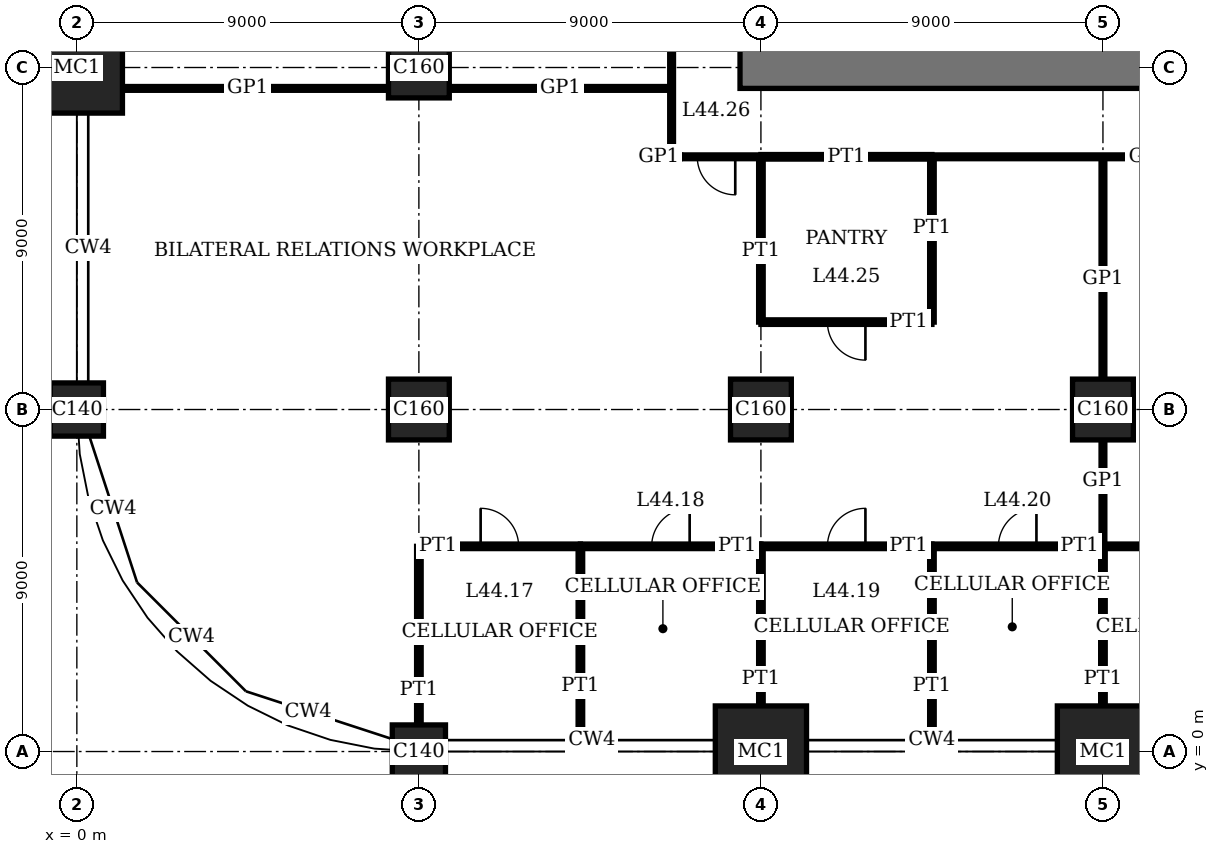
"""IFC4 building model, lengths in metres.
Left out: names, types, materials, properties, quantities, classifications, styles, units other than length and angle.
Written with IfcOpenShell. Run it as: python <this file> out.ifc"""

import sys

from ifc_helpers import new_model, si_unit, direction, frame, frame_2d, origin, origin_2d, place, context, subcontext, project, spatial, rectangle, extrude, element, fill, save


model = new_model("IFC4")
c1 = context("Model", 3, precision=1e-05, world=origin(), true_north=direction((0.0, 1.0)))
c2 = subcontext(c1, "Body", "Model", "MODEL_VIEW")
j1 = project(units=[si_unit("LENGTHUNIT", "METRE"), si_unit("PLANEANGLEUNIT", "RADIAN")], contexts=[c1])
p1 = place(None, origin())
s1 = spatial("IfcSite", under=j1, at=p1, CompositionType="ELEMENT")
p2 = place(p1, origin())
s2 = spatial("IfcBuilding", under=s1, at=p2, CompositionType="ELEMENT")
p3 = place(p2, frame((0.0, 0.0, 182.2)))
s3 = spatial("IfcBuildingStorey", under=s2, at=p3, CompositionType="ELEMENT", Elevation=182.2)
p4 = place(p3, frame((0.0, 9.0, 0.0), z_axis=(0.0, 0.0, 1.0), x_axis=(1.0, 0.0, 0.0)))
e1 = element("IfcColumn", 1, at=p4, inside=s3, PredefinedType="COLUMN", context=c2, shape_type="SweptSolid", body=[
    extrude(rectangle(XDim=1.4, YDim=1.4, at=origin_2d()), origin(), (0.0, 0.0, 1.0), 4.0),
])
p5 = place(p3, frame((0.0, 18.0, 0.0), z_axis=(0.0, 0.0, 1.0), x_axis=(1.0, 0.0, 0.0)))
e2 = element("IfcColumn", 2, at=p5, inside=s3, PredefinedType="COLUMN", context=c2, shape_type="SweptSolid", body=[
    extrude(rectangle(XDim=2.4, YDim=2.4, at=origin_2d()), origin(), (0.0, 0.0, 1.0), 4.0),
])
p6 = place(p3, frame((9.0, 0.0, 0.0), z_axis=(0.0, 0.0, 1.0), x_axis=(1.0, 0.0, 0.0)))
e3 = element("IfcColumn", 3, at=p6, inside=s3, PredefinedType="COLUMN", context=c2, shape_type="SweptSolid", body=[
    extrude(rectangle(XDim=1.4, YDim=1.4, at=origin_2d()), origin(), (0.0, 0.0, 1.0), 4.0),
])
for number, where, z_axis, x_axis in (
    (4, (9.0, 9.0, 0.0), (0.0, 0.0, 1.0), (1.0, 0.0, 0.0)),
    (5, (9.0, 18.0, 0.0), (0.0, 0.0, 1.0), (1.0, 0.0, 0.0)),
):
    element("IfcColumn", number, at=place(p3, frame(where, z_axis=z_axis, x_axis=x_axis)), inside=s3, PredefinedType="COLUMN", context=c2, shape_type="SweptSolid", body=[
        extrude(rectangle(XDim=1.6, YDim=1.6, at=origin_2d()), origin(), (0.0, 0.0, 1.0), 4.0),
    ])
p7 = place(p3, frame((18.0, 0.0, 0.0), z_axis=(0.0, 0.0, 1.0), x_axis=(1.0, 0.0, 0.0)))
e6 = element("IfcColumn", 6, at=p7, inside=s3, PredefinedType="COLUMN", context=c2, shape_type="SweptSolid", body=[
    extrude(rectangle(XDim=2.4, YDim=2.4, at=origin_2d()), origin(), (0.0, 0.0, 1.0), 4.0),
])
p8 = place(p3, frame((18.0, 9.0, 0.0), z_axis=(0.0, 0.0, 1.0), x_axis=(1.0, 0.0, 0.0)))
e7 = element("IfcColumn", 7, at=p8, inside=s3, PredefinedType="COLUMN", context=c2, shape_type="SweptSolid", body=[
    extrude(rectangle(XDim=1.6, YDim=1.6, at=origin_2d()), origin(), (0.0, 0.0, 1.0), 4.0),
])
p9 = place(p3, frame((27.0, 0.0, 0.0), z_axis=(0.0, 0.0, 1.0), x_axis=(1.0, 0.0, 0.0)))
e8 = element("IfcColumn", 8, at=p9, inside=s3, PredefinedType="COLUMN", context=c2, shape_type="SweptSolid", body=[
    extrude(rectangle(XDim=2.4, YDim=2.4, at=origin_2d()), origin(), (0.0, 0.0, 1.0), 4.0),
])
p10 = place(p3, frame((27.0, 9.0, 0.0), z_axis=(0.0, 0.0, 1.0), x_axis=(1.0, 0.0, 0.0)))
e9 = element("IfcColumn", 9, at=p10, inside=s3, PredefinedType="COLUMN", context=c2, shape_type="SweptSolid", body=[
    extrude(rectangle(XDim=1.6, YDim=1.6, at=origin_2d()), origin(), (0.0, 0.0, 1.0), 4.0),
])
p11 = place(p3, frame((17.45, 18.0, 0.0), z_axis=(0.0, 0.0, 1.0), x_axis=(1.0, 0.0, 0.0)))
e10 = element("IfcWall", 10, at=p11, inside=s3, PredefinedType="SHEAR", context=c2, shape_type="SweptSolid", body=[
    extrude(rectangle(XDim=28.1, YDim=1.1, at=frame_2d((14.05, 0.0))), origin(), (0.0, 0.0, 1.0), 4.0),
])
p12 = place(p11, frame((11.55, 0.0, 0.0)))
e11 = element("IfcOpeningElement", 11, at=p12, cuts=e10, PredefinedType="OPENING", context=c2, shape_type="SweptSolid", body=[
    extrude(rectangle(XDim=1.0, YDim=2.4, at=frame_2d((0.5, 1.2))), frame((0.0, 0.56, 0.0), z_axis=(0.0, -1.0, 0.0), x_axis=(1.0, 0.0, 0.0)), (0.0, 0.0, 1.0), 1.12),
])
p13 = place(p11, frame((16.55, 0.0, 0.0)))
e12 = element("IfcOpeningElement", 12, at=p13, cuts=e10, PredefinedType="OPENING", context=c2, shape_type="SweptSolid", body=[
    extrude(rectangle(XDim=1.0, YDim=2.4, at=frame_2d((0.5, 1.2))), frame((0.0, 0.56, 0.0), z_axis=(0.0, -1.0, 0.0), x_axis=(1.0, 0.0, 0.0)), (0.0, 0.0, 1.0), 1.12),
])
p14 = place(p11, frame((20.0, 0.0, 0.0)))
e13 = element("IfcOpeningElement", 13, at=p14, cuts=e10, PredefinedType="OPENING", context=c2, shape_type="SweptSolid", body=[
    extrude(rectangle(XDim=1.1, YDim=2.4, at=frame_2d((0.55, 1.2))), frame((0.0, 0.56, 0.0), z_axis=(0.0, -1.0, 0.0), x_axis=(1.0, 0.0, 0.0)), (0.0, 0.0, 1.0), 1.12),
])
p15 = place(p11, frame((24.05, 0.0, 0.0)))
e14 = element("IfcOpeningElement", 14, at=p15, cuts=e10, PredefinedType="OPENING", context=c2, shape_type="SweptSolid", body=[
    extrude(rectangle(XDim=1.0, YDim=2.4, at=frame_2d((0.5, 1.2))), frame((0.0, 0.56, 0.0), z_axis=(0.0, -1.0, 0.0), x_axis=(1.0, 0.0, 0.0)), (0.0, 0.0, 1.0), 1.12),
])
p16 = place(p3, frame((9.0, 5.4, 0.0), z_axis=(0.0, 0.0, 1.0), x_axis=(1.0, 0.0, 0.0)))
e15 = element("IfcWall", 15, at=p16, inside=s3, PredefinedType="PARTITIONING", context=c2, shape_type="SweptSolid", body=[
    extrude(rectangle(XDim=4.25, YDim=0.12, at=frame_2d((2.125, 0.0))), origin(), (0.0, 0.0, 1.0), 3.75),
])
p17 = place(p16, frame((1.625, 0.0, 0.0)))
e16 = element("IfcOpeningElement", 16, at=p17, cuts=e15, PredefinedType="OPENING", context=c2, shape_type="SweptSolid", body=[
    extrude(rectangle(XDim=1.0, YDim=2.4, at=frame_2d((0.5, 1.2))), frame((0.0, 0.07, 0.0), z_axis=(0.0, -1.0, 0.0), x_axis=(1.0, 0.0, 0.0)), (0.0, 0.0, 1.0), 0.14),
])
p18 = place(p3, frame((13.25, 5.4, 0.0), z_axis=(0.0, 0.0, 1.0), x_axis=(1.0, 0.0, 0.0)))
e17 = element("IfcWall", 17, at=p18, inside=s3, PredefinedType="PARTITIONING", context=c2, shape_type="SweptSolid", body=[
    extrude(rectangle(XDim=4.75, YDim=0.12, at=frame_2d((2.375, 0.0))), origin(), (0.0, 0.0, 1.0), 3.75),
])
p19 = place(p18, frame((1.875, 0.0, 0.0)))
e18 = element("IfcOpeningElement", 18, at=p19, cuts=e17, PredefinedType="OPENING", context=c2, shape_type="SweptSolid", body=[
    extrude(rectangle(XDim=1.0, YDim=2.4, at=frame_2d((0.5, 1.2))), frame((0.0, 0.07, 0.0), z_axis=(0.0, -1.0, 0.0), x_axis=(1.0, 0.0, 0.0)), (0.0, 0.0, 1.0), 0.14),
])
p20 = place(p3, frame((18.0, 5.4, 0.0), z_axis=(0.0, 0.0, 1.0), x_axis=(1.0, 0.0, 0.0)))
e19 = element("IfcWall", 19, at=p20, inside=s3, PredefinedType="PARTITIONING", context=c2, shape_type="SweptSolid", body=[
    extrude(rectangle(XDim=4.5, YDim=0.12, at=frame_2d((2.25, 0.0))), origin(), (0.0, 0.0, 1.0), 3.75),
])
p21 = place(p20, frame((1.75, 0.0, 0.0)))
e20 = element("IfcOpeningElement", 20, at=p21, cuts=e19, PredefinedType="OPENING", context=c2, shape_type="SweptSolid", body=[
    extrude(rectangle(XDim=1.0, YDim=2.4, at=frame_2d((0.5, 1.2))), frame((0.0, 0.07, 0.0), z_axis=(0.0, -1.0, 0.0), x_axis=(1.0, 0.0, 0.0)), (0.0, 0.0, 1.0), 0.14),
])
p22 = place(p3, frame((22.5, 5.4, 0.0), z_axis=(0.0, 0.0, 1.0), x_axis=(1.0, 0.0, 0.0)))
e21 = element("IfcWall", 21, at=p22, inside=s3, PredefinedType="PARTITIONING", context=c2, shape_type="SweptSolid", body=[
    extrude(rectangle(XDim=4.5, YDim=0.12, at=frame_2d((2.25, 0.0))), origin(), (0.0, 0.0, 1.0), 3.75),
])
p23 = place(p22, frame((1.75, 0.0, 0.0)))
e22 = element("IfcOpeningElement", 22, at=p23, cuts=e21, PredefinedType="OPENING", context=c2, shape_type="SweptSolid", body=[
    extrude(rectangle(XDim=1.0, YDim=2.4, at=frame_2d((0.5, 1.2))), frame((0.0, 0.07, 0.0), z_axis=(0.0, -1.0, 0.0), x_axis=(1.0, 0.0, 0.0)), (0.0, 0.0, 1.0), 0.14),
])
p24 = place(p3, frame((27.0, 5.4, 0.0), z_axis=(0.0, 0.0, 1.0), x_axis=(1.0, 0.0, 0.0)))
e23 = element("IfcWall", 23, at=p24, inside=s3, PredefinedType="PARTITIONING", context=c2, shape_type="SweptSolid", body=[
    extrude(rectangle(XDim=4.5, YDim=0.12, at=frame_2d((2.25, 0.0))), origin(), (0.0, 0.0, 1.0), 3.75),
])
p25 = place(p24, frame((1.75, 0.0, 0.0)))
e24 = element("IfcOpeningElement", 24, at=p25, cuts=e23, PredefinedType="OPENING", context=c2, shape_type="SweptSolid", body=[
    extrude(rectangle(XDim=1.0, YDim=2.4, at=frame_2d((0.5, 1.2))), frame((0.0, 0.07, 0.0), z_axis=(0.0, -1.0, 0.0), x_axis=(1.0, 0.0, 0.0)), (0.0, 0.0, 1.0), 0.14),
])
p26 = place(p3, frame((18.0, 11.3, 0.0), z_axis=(0.0, 0.0, 1.0), x_axis=(1.0, 0.0, 0.0)))
e25 = element("IfcWall", 25, at=p26, inside=s3, PredefinedType="PARTITIONING", context=c2, shape_type="SweptSolid", body=[
    extrude(rectangle(XDim=4.5, YDim=0.12, at=frame_2d((2.25, 0.0))), origin(), (0.0, 0.0, 1.0), 3.75),
])
p27 = place(p26, frame((1.75, 0.0, 0.0)))
e26 = element("IfcOpeningElement", 26, at=p27, cuts=e25, PredefinedType="OPENING", context=c2, shape_type="SweptSolid", body=[
    extrude(rectangle(XDim=1.0, YDim=2.4, at=frame_2d((0.5, 1.2))), frame((0.0, 0.07, 0.0), z_axis=(0.0, -1.0, 0.0), x_axis=(1.0, 0.0, 0.0)), (0.0, 0.0, 1.0), 0.14),
])
p28 = place(p3, frame((18.0, 15.65, 0.0), z_axis=(0.0, 0.0, 1.0), x_axis=(1.0, 0.0, 0.0)))
e27 = element("IfcWall", 27, at=p28, inside=s3, PredefinedType="PARTITIONING", context=c2, shape_type="SweptSolid", body=[
    extrude(rectangle(XDim=4.5, YDim=0.12, at=frame_2d((2.25, 0.0))), origin(), (0.0, 0.0, 1.0), 3.75),
])
p29 = place(p3, frame((15.65, 15.65, 0.0), z_axis=(0.0, 0.0, 1.0), x_axis=(1.0, 0.0, 0.0)))
e28 = element("IfcWall", 28, at=p29, inside=s3, PredefinedType="PARTITIONING", context=c2, shape_type="SweptSolid", body=[
    extrude(rectangle(XDim=2.35, YDim=0.1, at=frame_2d((1.175, 0.0))), origin(), (0.0, 0.0, 1.0), 3.75),
])
p30 = place(p29, frame((0.675, 0.0, 0.0)))
e29 = element("IfcOpeningElement", 29, at=p30, cuts=e28, PredefinedType="OPENING", context=c2, shape_type="SweptSolid", body=[
    extrude(rectangle(XDim=1.0, YDim=2.4, at=frame_2d((0.5, 1.2))), frame((0.0, 0.06, 0.0), z_axis=(0.0, -1.0, 0.0), x_axis=(1.0, 0.0, 0.0)), (0.0, 0.0, 1.0), 0.12),
])
p31 = place(p3, frame((22.5, 15.65, 0.0), z_axis=(0.0, 0.0, 1.0), x_axis=(1.0, 0.0, 0.0)))
e30 = element("IfcWall", 30, at=p31, inside=s3, PredefinedType="PARTITIONING", context=c2, shape_type="SweptSolid", body=[
    extrude(rectangle(XDim=24.85, YDim=0.1, at=frame_2d((12.425, 0.0))), origin(), (0.0, 0.0, 1.0), 3.75),
])
p32 = place(p31, frame((11.925, 0.0, 0.0)))
e31 = element("IfcOpeningElement", 31, at=p32, cuts=e30, PredefinedType="OPENING", context=c2, shape_type="SweptSolid", body=[
    extrude(rectangle(XDim=1.0, YDim=2.4, at=frame_2d((0.5, 1.2))), frame((0.0, 0.06, 0.0), z_axis=(0.0, -1.0, 0.0), x_axis=(1.0, 0.0, 0.0)), (0.0, 0.0, 1.0), 0.12),
])
p33 = place(p3, frame((1.2, 17.45, 0.0), z_axis=(0.0, 0.0, 1.0), x_axis=(1.0, 0.0, 0.0)))
e32 = element("IfcWall", 32, at=p33, inside=s3, PredefinedType="PARTITIONING", context=c2, shape_type="SweptSolid", body=[
    extrude(rectangle(XDim=7.0, YDim=0.1, at=frame_2d((3.5, 0.0))), origin(), (0.0, 0.0, 1.0), 3.75),
])
p34 = place(p3, frame((9.8, 17.45, 0.0), z_axis=(0.0, 0.0, 1.0), x_axis=(1.0, 0.0, 0.0)))
e33 = element("IfcWall", 33, at=p34, inside=s3, PredefinedType="PARTITIONING", context=c2, shape_type="SweptSolid", body=[
    extrude(rectangle(XDim=5.85, YDim=0.1, at=frame_2d((2.925, 0.0))), origin(), (0.0, 0.0, 1.0), 3.75),
])
p35 = place(p3, frame((9.0, 0.7, 0.0), z_axis=(0.0, 0.0, 1.0), x_axis=(0.0, 1.0, 0.0)))
e34 = element("IfcWall", 34, at=p35, inside=s3, PredefinedType="PARTITIONING", context=c2, shape_type="SweptSolid", body=[
    extrude(rectangle(XDim=4.7, YDim=0.12, at=frame_2d((2.35, 0.0))), origin(), (0.0, 0.0, 1.0), 3.05),
])
p36 = place(p3, frame((13.25, 0.31, 0.0), z_axis=(0.0, 0.0, 1.0), x_axis=(0.0, 1.0, 0.0)))
e35 = element("IfcWall", 35, at=p36, inside=s3, PredefinedType="PARTITIONING", context=c2, shape_type="SweptSolid", body=[
    extrude(rectangle(XDim=5.09, YDim=0.12, at=frame_2d((2.545, 0.0))), origin(), (0.0, 0.0, 1.0), 3.75),
])
p37 = place(p3, frame((15.65, 15.65, 0.0), z_axis=(0.0, 0.0, 1.0), x_axis=(0.0, 1.0, 0.0)))
e36 = element("IfcWall", 36, at=p37, inside=s3, PredefinedType="PARTITIONING", context=c2, shape_type="SweptSolid", body=[
    extrude(rectangle(XDim=6.85, YDim=0.1, at=frame_2d((3.425, 0.0))), origin(), (0.0, 0.0, 1.0), 3.75),
])
p38 = place(p37, frame((2.925, 0.0, 0.0)))
e37 = element("IfcOpeningElement", 37, at=p38, cuts=e36, PredefinedType="OPENING", context=c2, shape_type="SweptSolid", body=[
    extrude(rectangle(XDim=1.0, YDim=2.4, at=frame_2d((0.5, 1.2))), frame((0.0, 0.06, 0.0), z_axis=(0.0, -1.0, 0.0), x_axis=(1.0, 0.0, 0.0)), (0.0, 0.0, 1.0), 0.12),
])
p39 = place(p3, frame((18.0, 1.2, 0.0), z_axis=(0.0, 0.0, 1.0), x_axis=(0.0, 1.0, 0.0)))
e38 = element("IfcWall", 38, at=p39, inside=s3, PredefinedType="PARTITIONING", context=c2, shape_type="SweptSolid", body=[
    extrude(rectangle(XDim=4.2, YDim=0.12, at=frame_2d((2.1, 0.0))), origin(), (0.0, 0.0, 1.0), 3.05),
])
p40 = place(p3, frame((18.0, 11.3, 0.0), z_axis=(0.0, 0.0, 1.0), x_axis=(0.0, 1.0, 0.0)))
e39 = element("IfcWall", 39, at=p40, inside=s3, PredefinedType="PARTITIONING", context=c2, shape_type="SweptSolid", body=[
    extrude(rectangle(XDim=4.35, YDim=0.12, at=frame_2d((2.175, 0.0))), origin(), (0.0, 0.0, 1.0), 3.05),
])
p41 = place(p3, frame((22.5, 0.31, 0.0), z_axis=(0.0, 0.0, 1.0), x_axis=(0.0, 1.0, 0.0)))
e40 = element("IfcWall", 40, at=p41, inside=s3, PredefinedType="PARTITIONING", context=c2, shape_type="SweptSolid", body=[
    extrude(rectangle(XDim=5.09, YDim=0.12, at=frame_2d((2.545, 0.0))), origin(), (0.0, 0.0, 1.0), 3.75),
])
p42 = place(p3, frame((22.5, 11.3, 0.0), z_axis=(0.0, 0.0, 1.0), x_axis=(0.0, 1.0, 0.0)))
e41 = element("IfcWall", 41, at=p42, inside=s3, PredefinedType="PARTITIONING", context=c2, shape_type="SweptSolid", body=[
    extrude(rectangle(XDim=4.35, YDim=0.12, at=frame_2d((2.175, 0.0))), origin(), (0.0, 0.0, 1.0), 3.75),
])
p43 = place(p3, frame((27.0, 1.2, 0.0), z_axis=(0.0, 0.0, 1.0), x_axis=(0.0, 1.0, 0.0)))
e42 = element("IfcWall", 42, at=p43, inside=s3, PredefinedType="PARTITIONING", context=c2, shape_type="SweptSolid", body=[
    extrude(rectangle(XDim=4.2, YDim=0.12, at=frame_2d((2.1, 0.0))), origin(), (0.0, 0.0, 1.0), 3.05),
])
p44 = place(p3, frame((27.0, 5.4, 0.0), z_axis=(0.0, 0.0, 1.0), x_axis=(0.0, 1.0, 0.0)))
e43 = element("IfcWall", 43, at=p44, inside=s3, PredefinedType="PARTITIONING", context=c2, shape_type="SweptSolid", body=[
    extrude(rectangle(XDim=2.8, YDim=0.1, at=frame_2d((1.4, 0.0))), origin(), (0.0, 0.0, 1.0), 3.05),
])
p45 = place(p3, frame((27.0, 9.8, 0.0), z_axis=(0.0, 0.0, 1.0), x_axis=(0.0, 1.0, 0.0)))
e44 = element("IfcWall", 44, at=p45, inside=s3, PredefinedType="PARTITIONING", context=c2, shape_type="SweptSolid", body=[
    extrude(rectangle(XDim=5.85, YDim=0.1, at=frame_2d((2.925, 0.0))), origin(), (0.0, 0.0, 1.0), 3.05),
])
p46 = place(p17, origin())
e45 = element("IfcDoor", 45, at=p46, inside=s3, OperationType="SINGLE_SWING_RIGHT", PredefinedType="DOOR", context=c2, shape_type="SweptSolid", body=[
    extrude(rectangle(XDim=1.0, YDim=2.4, at=frame_2d((0.5, 1.2))), frame((0.0, 0.025, 0.0), z_axis=(0.0, -1.0, 0.0), x_axis=(1.0, 0.0, 0.0)), (0.0, 0.0, 1.0), 0.05),
])
fill(e16, e45)
p47 = place(p19, origin())
e46 = element("IfcDoor", 46, at=p47, inside=s3, OperationType="SINGLE_SWING_LEFT", PredefinedType="DOOR", context=c2, shape_type="SweptSolid", body=[
    extrude(rectangle(XDim=1.0, YDim=2.4, at=frame_2d((0.5, 1.2))), frame((0.0, 0.025, 0.0), z_axis=(0.0, -1.0, 0.0), x_axis=(1.0, 0.0, 0.0)), (0.0, 0.0, 1.0), 0.05),
])
fill(e18, e46)
p48 = place(p21, origin())
e47 = element("IfcDoor", 47, at=p48, inside=s3, OperationType="SINGLE_SWING_LEFT", PredefinedType="DOOR", context=c2, shape_type="SweptSolid", body=[
    extrude(rectangle(XDim=1.0, YDim=2.4, at=frame_2d((0.5, 1.2))), frame((0.0, 0.025, 0.0), z_axis=(0.0, -1.0, 0.0), x_axis=(1.0, 0.0, 0.0)), (0.0, 0.0, 1.0), 0.05),
])
fill(e20, e47)
p49 = place(p23, origin())
e48 = element("IfcDoor", 48, at=p49, inside=s3, OperationType="SINGLE_SWING_LEFT", PredefinedType="DOOR", context=c2, shape_type="SweptSolid", body=[
    extrude(rectangle(XDim=1.0, YDim=2.4, at=frame_2d((0.5, 1.2))), frame((0.0, 0.025, 0.0), z_axis=(0.0, -1.0, 0.0), x_axis=(1.0, 0.0, 0.0)), (0.0, 0.0, 1.0), 0.05),
])
fill(e22, e48)
p50 = place(p27, origin())
e49 = element("IfcDoor", 49, at=p50, inside=s3, OperationType="SINGLE_SWING_RIGHT", PredefinedType="DOOR", context=c2, shape_type="SweptSolid", body=[
    extrude(rectangle(XDim=1.0, YDim=2.4, at=frame_2d((0.5, 1.2))), frame((0.0, 0.025, 0.0), z_axis=(0.0, -1.0, 0.0), x_axis=(1.0, 0.0, 0.0)), (0.0, 0.0, 1.0), 0.05),
])
fill(e26, e49)
p51 = place(p30, origin())
e50 = element("IfcDoor", 50, at=p51, inside=s3, OperationType="SINGLE_SWING_RIGHT", PredefinedType="DOOR", context=c2, shape_type="SweptSolid", body=[
    extrude(rectangle(XDim=1.0, YDim=2.4, at=frame_2d((0.5, 1.2))), frame((0.0, 0.02, 0.0), z_axis=(0.0, -1.0, 0.0), x_axis=(1.0, 0.0, 0.0)), (0.0, 0.0, 1.0), 0.04),
])
fill(e29, e50)
save(model, sys.argv[1])
